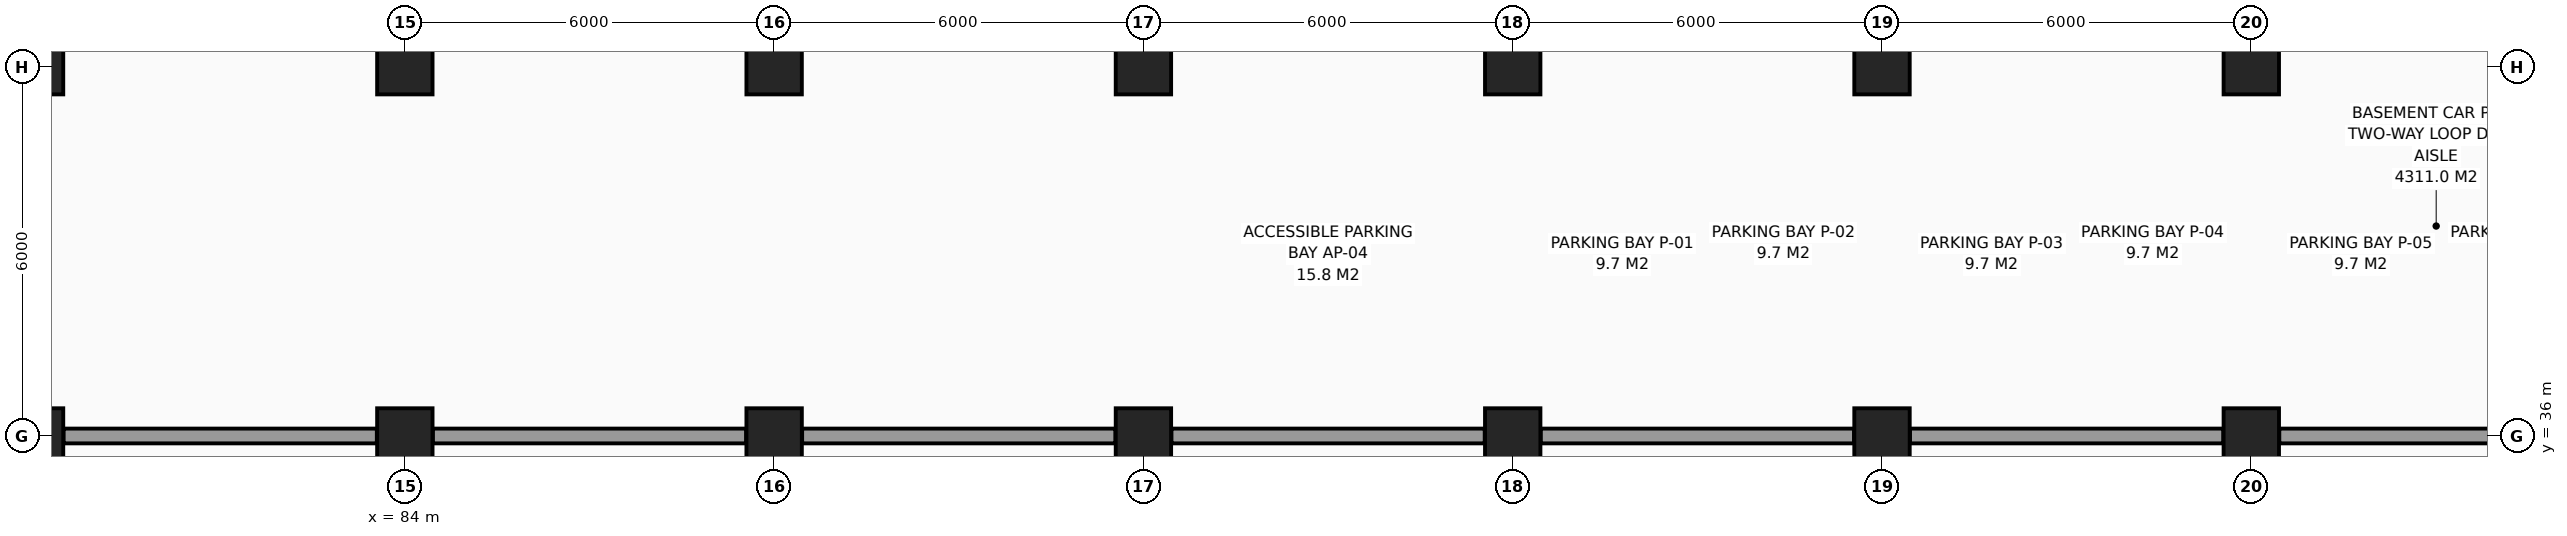
"""IFC4 building model, lengths in metres.
Left out: names, types, materials, properties, quantities, classifications, styles, units other than length and angle.
Written with IfcOpenShell. Run it as: python <this file> out.ifc"""

import sys

from ifc_helpers import new_model, si_unit, direction, frame, frame_2d, origin, origin_2d, place, context, subcontext, project, spatial, rectangle, extrude, element, save


model = new_model("IFC4")
c1 = context("Model", 3, precision=1e-05, world=origin(), true_north=direction((0.0, 1.0)))
c2 = subcontext(c1, "Body", "Model", "MODEL_VIEW")
j1 = project(units=[si_unit("LENGTHUNIT", "METRE"), si_unit("PLANEANGLEUNIT", "RADIAN")], contexts=[c1])
p1 = place(None, origin())
s1 = spatial("IfcSite", under=j1, at=p1, CompositionType="ELEMENT")
p2 = place(p1, origin())
s2 = spatial("IfcBuilding", under=s1, at=p2, CompositionType="ELEMENT")
p3 = place(p2, frame((0.0, 0.0, -4.8)))
s3 = spatial("IfcBuildingStorey", under=s2, at=p3, CompositionType="ELEMENT", Elevation=-4.8)
for number, where, z_axis, x_axis in (
    (1, (78.0, 36.0, 0.0), (0.0, 0.0, 1.0), (1.0, 0.0, 0.0)),
    (2, (78.0, 42.0, 0.0), (0.0, 0.0, 1.0), (1.0, 0.0, 0.0)),
    (3, (84.0, 36.0, 0.0), (0.0, 0.0, 1.0), (1.0, 0.0, 0.0)),
    (4, (84.0, 42.0, 0.0), (0.0, 0.0, 1.0), (1.0, 0.0, 0.0)),
    (5, (90.0, 36.0, 0.0), (0.0, 0.0, 1.0), (1.0, 0.0, 0.0)),
    (6, (90.0, 42.0, 0.0), (0.0, 0.0, 1.0), (1.0, 0.0, 0.0)),
    (7, (96.0, 36.0, 0.0), (0.0, 0.0, 1.0), (1.0, 0.0, 0.0)),
    (8, (96.0, 42.0, 0.0), (0.0, 0.0, 1.0), (1.0, 0.0, 0.0)),
    (9, (102.0, 36.0, 0.0), (0.0, 0.0, 1.0), (1.0, 0.0, 0.0)),
    (10, (102.0, 42.0, 0.0), (0.0, 0.0, 1.0), (1.0, 0.0, 0.0)),
    (11, (108.0, 36.0, 0.0), (0.0, 0.0, 1.0), (1.0, 0.0, 0.0)),
    (12, (108.0, 42.0, 0.0), (0.0, 0.0, 1.0), (1.0, 0.0, 0.0)),
    (13, (114.0, 36.0, 0.0), (0.0, 0.0, 1.0), (1.0, 0.0, 0.0)),
    (14, (114.0, 42.0, 0.0), (0.0, 0.0, 1.0), (1.0, 0.0, 0.0)),
):
    element("IfcColumn", number, at=place(p3, frame(where, z_axis=z_axis, x_axis=x_axis)), inside=s3, PredefinedType="COLUMN", context=c2, shape_type="SweptSolid", body=[
        extrude(rectangle(XDim=0.9, YDim=0.9, at=origin_2d()), origin(), (0.0, 0.0, 1.0), 4.8),
    ])
p4 = place(p3, frame((78.455, 36.0, 0.0), z_axis=(0.0, 0.0, 1.0), x_axis=(1.0, 0.0, 0.0)))
e15 = element("IfcWall", 15, at=p4, inside=s3, PredefinedType="PARTITIONING", context=c2, shape_type="SweptSolid", body=[
    extrude(rectangle(XDim=5.09, YDim=0.24, at=frame_2d((2.545, 0.0))), origin(), (0.0, 0.0, 1.0), 4.05),
])
p5 = place(p3, frame((84.455, 36.0, 0.0), z_axis=(0.0, 0.0, 1.0), x_axis=(1.0, 0.0, 0.0)))
e16 = element("IfcWall", 16, at=p5, inside=s3, PredefinedType="PARTITIONING", context=c2, shape_type="SweptSolid", body=[
    extrude(rectangle(XDim=5.09, YDim=0.24, at=frame_2d((2.545, 0.0))), origin(), (0.0, 0.0, 1.0), 4.21),
])
for number, where, z_axis, x_axis in (
    (17, (90.455, 36.0, 0.0), (0.0, 0.0, 1.0), (1.0, 0.0, 0.0)),
    (18, (96.455, 36.0, 0.0), (0.0, 0.0, 1.0), (1.0, 0.0, 0.0)),
    (19, (102.455, 36.0, 0.0), (0.0, 0.0, 1.0), (1.0, 0.0, 0.0)),
    (20, (108.455, 36.0, 0.0), (0.0, 0.0, 1.0), (1.0, 0.0, 0.0)),
    (21, (114.455, 36.0, 0.0), (0.0, 0.0, 1.0), (1.0, 0.0, 0.0)),
):
    element("IfcWall", number, at=place(p3, frame(where, z_axis=z_axis, x_axis=x_axis)), inside=s3, PredefinedType="PARTITIONING", context=c2, shape_type="SweptSolid", body=[
        extrude(rectangle(XDim=5.09, YDim=0.24, at=frame_2d((2.545, 0.0))), origin(), (0.0, 0.0, 1.0), 3.7),
    ])
save(model, sys.argv[1])
